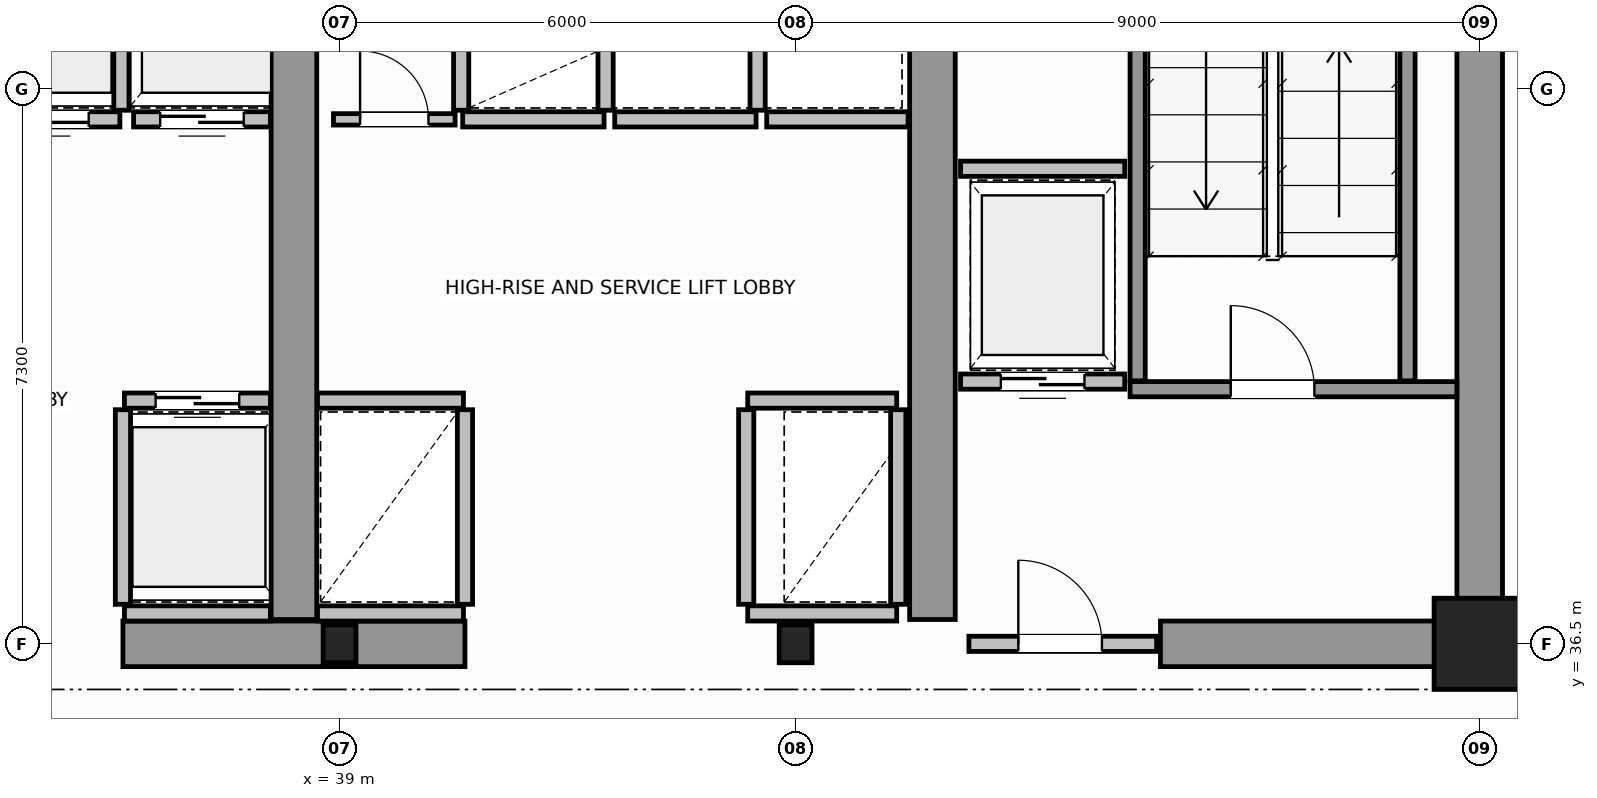
"""IFC4 building model, lengths in metres.
Left out: names, types, materials, properties, quantities, classifications, styles, units other than length and angle.
Written with IfcOpenShell. Run it as: python <this file> out.ifc"""

import sys

from ifc_helpers import new_model, si_unit, direction, frame, frame_2d, origin, origin_2d, place, context, subcontext, project, spatial, rectangle, i_section, extrude, source, transform, mapped, element, fill, save


model = new_model("IFC4")
c1 = context("Model", 3, precision=1e-05, world=origin(), true_north=direction((0.0, 1.0)))
c2 = subcontext(c1, "Body", "Model", "MODEL_VIEW")
j1 = project(units=[si_unit("LENGTHUNIT", "METRE"), si_unit("PLANEANGLEUNIT", "RADIAN")], contexts=[c1])
p1 = place(None, origin())
s1 = spatial("IfcSite", under=j1, at=p1, CompositionType="ELEMENT")
p2 = place(p1, origin())
s2 = spatial("IfcBuilding", under=s1, at=p2, CompositionType="ELEMENT")
p3 = place(p2, frame((0.0, 0.0, 184.2)))
s3 = spatial("IfcBuildingStorey", under=s2, at=p3, CompositionType="ELEMENT", Elevation=184.2)
m1 = source(origin(), c2, "Body", "SweptSolid", [
    extrude(i_section(OverallWidth=0.432, OverallDepth=0.498, WebThickness=0.055, FlangeThickness=0.068, FilletRadius=0.015, at=origin_2d()), origin(), (0.0, 0.0, 1.0), 3.8),
])
for number, where, z_axis, x_axis in (
    (1, (39.0, 36.5, 0.0), (0.0, 0.0, 1.0), (1.0, 0.0, 0.0)),
    (2, (45.0, 36.5, 0.0), (0.0, 0.0, 1.0), (1.0, 0.0, 0.0)),
):
    element("IfcColumn", number, at=place(p3, frame(where, z_axis=z_axis, x_axis=x_axis)), inside=s3, PredefinedType="COLUMN", context=c2, shape_type="MappedRepresentation", body=[
        mapped(m1, transform((0.0, 0.0, 0.0), scale=1.0)),
    ])
m2 = source(origin(), c2, "Body", "SweptSolid", [
    extrude(rectangle(XDim=1.2, YDim=1.2, at=origin_2d()), origin(), (0.0, 0.0, 1.0), 3.8),
])
p4 = place(p3, frame((54.0, 36.5, 0.0), z_axis=(0.0, 0.0, 1.0), x_axis=(1.0, 0.0, 0.0)))
e3 = element("IfcColumn", 3, at=p4, inside=s3, PredefinedType="COLUMN", context=c2, shape_type="MappedRepresentation", body=[
    mapped(m2, transform((0.0, 0.0, 0.0), scale=1.0)),
])
p5 = place(p3, frame((54.0, 36.5, 0.0), z_axis=(0.0, 0.0, 1.0), x_axis=(0.0, 1.0, 0.0)))
e4 = element("IfcWall", 4, at=p5, inside=s3, PredefinedType="SHEAR", context=c2, shape_type="SweptSolid", body=[
    extrude(rectangle(XDim=14.5, YDim=0.6, at=frame_2d((7.25, 0.0))), origin(), (0.0, 0.0, 1.0), 3.8),
])
p6 = place(p3, frame((36.15, 36.5, 0.0), z_axis=(0.0, 0.0, 1.0), x_axis=(1.0, 0.0, 0.0)))
e5 = element("IfcWall", 5, at=p6, inside=s3, PredefinedType="SHEAR", context=c2, shape_type="SweptSolid", body=[
    extrude(rectangle(XDim=4.5, YDim=0.6, at=frame_2d((2.25, 0.0))), origin(), (0.0, 0.0, 1.0), 3.8),
])
p7 = place(p3, frame((49.8, 36.5, 0.0), z_axis=(0.0, 0.0, 1.0), x_axis=(1.0, 0.0, 0.0)))
e6 = element("IfcWall", 6, at=p7, inside=s3, PredefinedType="SHEAR", context=c2, shape_type="SweptSolid", body=[
    extrude(rectangle(XDim=3.88, YDim=0.6, at=frame_2d((1.94, 0.0))), origin(), (0.0, 0.0, 1.0), 2.58),
])
for number, where, z_axis, x_axis in (
    (7, (38.4, 36.82, 0.0), (0.0, 0.0, 1.0), (0.0, 1.0, 0.0)),
    (8, (46.8, 36.82, 0.0), (0.0, 0.0, 1.0), (0.0, 1.0, 0.0)),
):
    element("IfcWall", number, at=place(p3, frame(where, z_axis=z_axis, x_axis=x_axis)), inside=s3, PredefinedType="SHEAR", context=c2, shape_type="SweptSolid", body=[
        extrude(rectangle(XDim=9.38, YDim=0.6, at=frame_2d((4.69, 0.0))), origin(), (0.0, 0.0, 1.0), 3.8),
    ])
p8 = place(p3, frame((49.4, 39.85, 0.0), z_axis=(0.0, 0.0, 1.0), x_axis=(1.0, 0.0, 0.0)))
e9 = element("IfcWall", 9, at=p8, inside=s3, PredefinedType="SOLIDWALL", context=c2, shape_type="SweptSolid", body=[
    extrude(rectangle(XDim=4.3, YDim=0.2, at=frame_2d((2.15, 0.0))), origin(), (0.0, 0.0, 1.0), 3.8),
])
p9 = place(p8, frame((1.325, 0.0, 0.0)))
e10 = element("IfcOpeningElement", 10, at=p9, cuts=e9, PredefinedType="OPENING", context=c2, shape_type="SweptSolid", body=[
    extrude(rectangle(XDim=1.1, YDim=2.15, at=frame_2d((0.55, 1.075))), frame((0.0, 0.11, 0.0), z_axis=(0.0, -1.0, 0.0), x_axis=(1.0, 0.0, 0.0)), (0.0, 0.0, 1.0), 0.22),
])
for number, where, z_axis, x_axis in (
    (11, (49.5, 39.96, 0.0), (0.0, 0.0, 1.0), (0.0, 1.0, 0.0)),
    (12, (53.05, 39.96, 0.0), (0.0, 0.0, 1.0), (0.0, 1.0, 0.0)),
):
    element("IfcWall", number, at=place(p3, frame(where, z_axis=z_axis, x_axis=x_axis)), inside=s3, PredefinedType="SOLIDWALL", context=c2, shape_type="SweptSolid", body=[
        extrude(rectangle(XDim=9.93, YDim=0.2, at=frame_2d((4.965, 0.0))), origin(), (0.0, 0.0, 1.0), 3.8),
    ])
p10 = place(p3, frame((47.28, 36.5, 0.0), z_axis=(0.0, 0.0, 1.0), x_axis=(1.0, 0.0, 0.0)))
e13 = element("IfcWall", 13, at=p10, inside=s3, PredefinedType="SOLIDWALL", context=c2, shape_type="SweptSolid", body=[
    extrude(rectangle(XDim=2.47, YDim=0.2, at=frame_2d((1.235, 0.0))), origin(), (0.0, 0.0, 1.0), 2.57),
])
p11 = place(p10, frame((0.65, 0.0, 0.0)))
e14 = element("IfcOpeningElement", 14, at=p11, cuts=e13, PredefinedType="OPENING", context=c2, shape_type="SweptSolid", body=[
    extrude(rectangle(XDim=1.1, YDim=2.15, at=frame_2d((0.55, 1.075))), frame((0.0, 0.11, 0.0), z_axis=(0.0, -1.0, 0.0), x_axis=(1.0, 0.0, 0.0)), (0.0, 0.0, 1.0), 0.22),
])
p12 = place(p3, frame((36.17, 39.7, 0.0), z_axis=(0.0, 0.0, 1.0), x_axis=(1.0, 0.0, 0.0)))
e15 = element("IfcWall", 15, at=p12, inside=s3, PredefinedType="SOLIDWALL", context=c2, shape_type="SweptSolid", body=[
    extrude(rectangle(XDim=1.92, YDim=0.2, at=frame_2d((0.96, 0.0))), origin(), (0.0, 0.0, 1.0), 3.58),
])
p13 = place(p12, frame((0.41, 0.0, 0.0)))
e16 = element("IfcOpeningElement", 16, at=p13, cuts=e15, PredefinedType="OPENING", context=c2, shape_type="SweptSolid", body=[
    extrude(rectangle(XDim=1.1, YDim=2.15, at=frame_2d((0.55, 1.075))), frame((0.0, 0.11, 0.0), z_axis=(0.0, -1.0, 0.0), x_axis=(1.0, 0.0, 0.0)), (0.0, 0.0, 1.0), 0.22),
])
p14 = place(p3, frame((36.17, 36.9, 0.0), z_axis=(0.0, 0.0, 1.0), x_axis=(1.0, 0.0, 0.0)))
e17 = element("IfcWall", 17, at=p14, inside=s3, PredefinedType="SOLIDWALL", context=c2, shape_type="SweptSolid", body=[
    extrude(rectangle(XDim=1.92, YDim=0.2, at=frame_2d((0.96, 0.0))), origin(), (0.0, 0.0, 1.0), 3.58),
])
p15 = place(p3, frame((36.15, 37.02, 0.0), z_axis=(0.0, 0.0, 1.0), x_axis=(0.0, 1.0, 0.0)))
e18 = element("IfcWall", 18, at=p15, inside=s3, PredefinedType="SOLIDWALL", context=c2, shape_type="SweptSolid", body=[
    extrude(rectangle(XDim=2.56, YDim=0.2, at=frame_2d((1.28, 0.0))), origin(), (0.0, 0.0, 1.0), 3.58),
])
p16 = place(p3, frame((34.19, 43.4, 0.0), z_axis=(0.0, 0.0, 1.0), x_axis=(1.0, 0.0, 0.0)))
e19 = element("IfcWall", 19, at=p16, inside=s3, PredefinedType="SOLIDWALL", context=c2, shape_type="SweptSolid", body=[
    extrude(rectangle(XDim=1.92, YDim=0.2, at=frame_2d((0.96, 0.0))), origin(), (0.0, 0.0, 1.0), 3.58),
])
p17 = place(p16, frame((0.41, 0.0, 0.0)))
e20 = element("IfcOpeningElement", 20, at=p17, cuts=e19, PredefinedType="OPENING", context=c2, shape_type="SweptSolid", body=[
    extrude(rectangle(XDim=1.1, YDim=2.15, at=frame_2d((0.55, 1.075))), frame((0.0, 0.11, 0.0), z_axis=(0.0, -1.0, 0.0), x_axis=(1.0, 0.0, 0.0)), (0.0, 0.0, 1.0), 0.22),
])
p18 = place(p3, frame((36.13, 43.52, 0.0), z_axis=(0.0, 0.0, 1.0), x_axis=(0.0, 1.0, 0.0)))
e21 = element("IfcWall", 21, at=p18, inside=s3, PredefinedType="SOLIDWALL", context=c2, shape_type="SweptSolid", body=[
    extrude(rectangle(XDim=2.56, YDim=0.2, at=frame_2d((1.28, 0.0))), origin(), (0.0, 0.0, 1.0), 3.58),
])
p19 = place(p3, frame((36.29, 43.4, 0.0), z_axis=(0.0, 0.0, 1.0), x_axis=(1.0, 0.0, 0.0)))
e22 = element("IfcWall", 22, at=p19, inside=s3, PredefinedType="SOLIDWALL", context=c2, shape_type="SweptSolid", body=[
    extrude(rectangle(XDim=1.8, YDim=0.2, at=frame_2d((0.9, 0.0))), origin(), (0.0, 0.0, 1.0), 3.58),
])
p20 = place(p19, frame((0.35, 0.0, 0.0)))
e23 = element("IfcOpeningElement", 23, at=p20, cuts=e22, PredefinedType="OPENING", context=c2, shape_type="SweptSolid", body=[
    extrude(rectangle(XDim=1.1, YDim=2.15, at=frame_2d((0.55, 1.075))), frame((0.0, 0.11, 0.0), z_axis=(0.0, -1.0, 0.0), x_axis=(1.0, 0.0, 0.0)), (0.0, 0.0, 1.0), 0.22),
])
for number, where, z_axis, x_axis in (
    (24, (38.71, 39.7, 0.0), (0.0, 0.0, 1.0), (1.0, 0.0, 0.0)),
    (25, (38.71, 36.9, 0.0), (0.0, 0.0, 1.0), (1.0, 0.0, 0.0)),
):
    element("IfcWall", number, at=place(p3, frame(where, z_axis=z_axis, x_axis=x_axis)), inside=s3, PredefinedType="SOLIDWALL", context=c2, shape_type="SweptSolid", body=[
        extrude(rectangle(XDim=1.92, YDim=0.2, at=frame_2d((0.96, 0.0))), origin(), (0.0, 0.0, 1.0), 3.58),
    ])
p21 = place(p3, frame((40.65, 37.02, 0.0), z_axis=(0.0, 0.0, 1.0), x_axis=(0.0, 1.0, 0.0)))
e26 = element("IfcWall", 26, at=p21, inside=s3, PredefinedType="SOLIDWALL", context=c2, shape_type="SweptSolid", body=[
    extrude(rectangle(XDim=2.56, YDim=0.2, at=frame_2d((1.28, 0.0))), origin(), (0.0, 0.0, 1.0), 3.58),
])
p22 = place(p3, frame((44.37, 39.7, 0.0), z_axis=(0.0, 0.0, 1.0), x_axis=(1.0, 0.0, 0.0)))
e27 = element("IfcWall", 27, at=p22, inside=s3, PredefinedType="SOLIDWALL", context=c2, shape_type="SweptSolid", body=[
    extrude(rectangle(XDim=1.96, YDim=0.2, at=frame_2d((0.98, 0.0))), origin(), (0.0, 0.0, 1.0), 3.58),
])
p23 = place(p3, frame((44.37, 36.9, 0.0), z_axis=(0.0, 0.0, 1.0), x_axis=(1.0, 0.0, 0.0)))
e28 = element("IfcWall", 28, at=p23, inside=s3, PredefinedType="SOLIDWALL", context=c2, shape_type="SweptSolid", body=[
    extrude(rectangle(XDim=1.96, YDim=0.2, at=frame_2d((0.98, 0.0))), origin(), (0.0, 0.0, 1.0), 2.57),
])
for number, where, z_axis, x_axis in (
    (29, (44.35, 37.02, 0.0), (0.0, 0.0, 1.0), (0.0, 1.0, 0.0)),
    (30, (46.35, 37.02, 0.0), (0.0, 0.0, 1.0), (0.0, 1.0, 0.0)),
):
    element("IfcWall", number, at=place(p3, frame(where, z_axis=z_axis, x_axis=x_axis)), inside=s3, PredefinedType="SOLIDWALL", context=c2, shape_type="SweptSolid", body=[
        extrude(rectangle(XDim=2.56, YDim=0.2, at=frame_2d((1.28, 0.0))), origin(), (0.0, 0.0, 1.0), 3.58),
    ])
p24 = place(p3, frame((40.62, 43.4, 0.0), z_axis=(0.0, 0.0, 1.0), x_axis=(1.0, 0.0, 0.0)))
e31 = element("IfcWall", 31, at=p24, inside=s3, PredefinedType="SOLIDWALL", context=c2, shape_type="SweptSolid", body=[
    extrude(rectangle(XDim=1.86, YDim=0.2, at=frame_2d((0.93, 0.0))), origin(), (0.0, 0.0, 1.0), 3.58),
])
for number, where, z_axis, x_axis in (
    (32, (40.6, 43.52, 0.0), (0.0, 0.0, 1.0), (0.0, 1.0, 0.0)),
    (33, (42.5, 43.52, 0.0), (0.0, 0.0, 1.0), (0.0, 1.0, 0.0)),
):
    element("IfcWall", number, at=place(p3, frame(where, z_axis=z_axis, x_axis=x_axis)), inside=s3, PredefinedType="SOLIDWALL", context=c2, shape_type="SweptSolid", body=[
        extrude(rectangle(XDim=2.56, YDim=0.2, at=frame_2d((1.28, 0.0))), origin(), (0.0, 0.0, 1.0), 3.58),
    ])
p25 = place(p3, frame((42.62, 43.4, 0.0), z_axis=(0.0, 0.0, 1.0), x_axis=(1.0, 0.0, 0.0)))
e34 = element("IfcWall", 34, at=p25, inside=s3, PredefinedType="SOLIDWALL", context=c2, shape_type="SweptSolid", body=[
    extrude(rectangle(XDim=1.86, YDim=0.2, at=frame_2d((0.93, 0.0))), origin(), (0.0, 0.0, 1.0), 3.58),
])
p26 = place(p3, frame((44.5, 43.52, 0.0), z_axis=(0.0, 0.0, 1.0), x_axis=(0.0, 1.0, 0.0)))
e35 = element("IfcWall", 35, at=p26, inside=s3, PredefinedType="SOLIDWALL", context=c2, shape_type="SweptSolid", body=[
    extrude(rectangle(XDim=2.56, YDim=0.2, at=frame_2d((1.28, 0.0))), origin(), (0.0, 0.0, 1.0), 3.58),
])
p27 = place(p3, frame((44.62, 43.4, 0.0), z_axis=(0.0, 0.0, 1.0), x_axis=(1.0, 0.0, 0.0)))
e36 = element("IfcWall", 36, at=p27, inside=s3, PredefinedType="SOLIDWALL", context=c2, shape_type="SweptSolid", body=[
    extrude(rectangle(XDim=1.86, YDim=0.2, at=frame_2d((0.93, 0.0))), origin(), (0.0, 0.0, 1.0), 3.58),
])
p28 = place(p3, frame((47.17, 39.95, 0.0), z_axis=(0.0, 0.0, 1.0), x_axis=(1.0, 0.0, 0.0)))
e37 = element("IfcWall", 37, at=p28, inside=s3, PredefinedType="SOLIDWALL", context=c2, shape_type="SweptSolid", body=[
    extrude(rectangle(XDim=2.16, YDim=0.2, at=frame_2d((1.08, 0.0))), origin(), (0.0, 0.0, 1.0), 3.58),
])
p29 = place(p28, frame((0.53, 0.0, 0.0)))
e38 = element("IfcOpeningElement", 38, at=p29, cuts=e37, PredefinedType="OPENING", context=c2, shape_type="SweptSolid", body=[
    extrude(rectangle(XDim=1.1, YDim=2.15, at=frame_2d((0.55, 1.075))), frame((0.0, 0.11, 0.0), z_axis=(0.0, -1.0, 0.0), x_axis=(1.0, 0.0, 0.0)), (0.0, 0.0, 1.0), 0.22),
])
p30 = place(p3, frame((47.17, 42.75, 0.0), z_axis=(0.0, 0.0, 1.0), x_axis=(1.0, 0.0, 0.0)))
e39 = element("IfcWall", 39, at=p30, inside=s3, PredefinedType="SOLIDWALL", context=c2, shape_type="SweptSolid", body=[
    extrude(rectangle(XDim=2.16, YDim=0.2, at=frame_2d((1.08, 0.0))), origin(), (0.0, 0.0, 1.0), 3.58),
])
p31 = place(p3, frame((38.92, 43.4, 0.0), z_axis=(0.0, 0.0, 1.0), x_axis=(1.0, 0.0, 0.0)))
e40 = element("IfcWall", 40, at=p31, inside=s3, PredefinedType="PARTITIONING", context=c2, shape_type="SweptSolid", body=[
    extrude(rectangle(XDim=1.6, YDim=0.15, at=frame_2d((0.8, 0.0))), origin(), (0.0, 0.0, 1.0), 3.58),
])
p32 = place(p31, frame((0.35, 0.0, 0.0)))
e41 = element("IfcOpeningElement", 41, at=p32, cuts=e40, PredefinedType="OPENING", context=c2, shape_type="SweptSolid", body=[
    extrude(rectangle(XDim=0.9, YDim=2.1, at=frame_2d((0.45, 1.05))), frame((0.0, 0.085, 0.0), z_axis=(0.0, -1.0, 0.0), x_axis=(1.0, 0.0, 0.0)), (0.0, 0.0, 1.0), 0.17),
])
p33 = place(p3, frame((54.06, 36.48, 0.0), z_axis=(0.0, 0.0, 1.0), x_axis=(1.0, 0.0, 0.0)))
e42 = element("IfcWall", 42, at=p33, inside=s3, PredefinedType="PARTITIONING", context=c2, shape_type="SweptSolid", body=[
    extrude(rectangle(XDim=6.651, YDim=0.12, at=frame_2d((3.325, 0.0))), origin(), (0.0, 0.0, 1.0), 2.97),
])
p34 = place(p33, frame((2.875, 0.0, 0.0)))
e43 = element("IfcOpeningElement", 43, at=p34, cuts=e42, PredefinedType="OPENING", context=c2, shape_type="SweptSolid", body=[
    extrude(rectangle(XDim=0.9, YDim=2.15, at=frame_2d((0.45, 1.075))), frame((0.0, 0.07, 0.0), z_axis=(0.0, -1.0, 0.0), x_axis=(1.0, 0.0, 0.0)), (0.0, 0.0, 1.0), 0.14),
])
m3 = source(origin(), c2, "Body", "SweptSolid", [
    extrude(rectangle(XDim=1.1, YDim=2.15, at=frame_2d((0.55, 1.075))), frame((0.0, 0.025, 0.0), z_axis=(0.0, -1.0, 0.0), x_axis=(1.0, 0.0, 0.0)), (0.0, 0.0, 1.0), 0.05),
])
p35 = place(p9, origin())
e44 = element("IfcDoor", 44, at=p35, inside=s3, OperationType="SINGLE_SWING_RIGHT", PredefinedType="DOOR", context=c2, shape_type="MappedRepresentation", body=[
    mapped(m3, transform((0.0, 0.0, 0.0), scale=1.0)),
])
fill(e10, e44)
p36 = place(p11, origin())
e45 = element("IfcDoor", 45, at=p36, inside=s3, OperationType="SINGLE_SWING_LEFT", PredefinedType="DOOR", context=c2, shape_type="MappedRepresentation", body=[
    mapped(m3, transform((0.0, 0.0, 0.0), scale=1.0)),
])
fill(e14, e45)
p37 = place(p13, origin())
e46 = element("IfcDoor", 46, at=p37, inside=s3, OperationType="DOUBLE_DOOR_SLIDING", PredefinedType="DOOR", context=c2, shape_type="MappedRepresentation", body=[
    mapped(m3, transform((0.0, 0.0, 0.0), scale=1.0)),
])
fill(e16, e46)
p38 = place(p17, origin())
e47 = element("IfcDoor", 47, at=p38, inside=s3, OperationType="DOUBLE_DOOR_SLIDING", PredefinedType="DOOR", context=c2, shape_type="MappedRepresentation", body=[
    mapped(m3, transform((0.0, 0.0, 0.0), scale=1.0)),
])
fill(e20, e47)
p39 = place(p20, origin())
e48 = element("IfcDoor", 48, at=p39, inside=s3, OperationType="DOUBLE_DOOR_SLIDING", PredefinedType="DOOR", context=c2, shape_type="MappedRepresentation", body=[
    mapped(m3, transform((0.0, 0.0, 0.0), scale=1.0)),
])
fill(e23, e48)
p40 = place(p29, origin())
e49 = element("IfcDoor", 49, at=p40, inside=s3, OperationType="DOUBLE_DOOR_SLIDING", PredefinedType="DOOR", context=c2, shape_type="MappedRepresentation", body=[
    mapped(m3, transform((0.0, 0.0, 0.0), scale=1.0)),
])
fill(e38, e49)
m4 = source(origin(), c2, "Body", "SweptSolid", [
    extrude(rectangle(XDim=0.9, YDim=2.1, at=frame_2d((0.45, 1.05))), frame((0.0, 0.025, 0.0), z_axis=(0.0, -1.0, 0.0), x_axis=(1.0, 0.0, 0.0)), (0.0, 0.0, 1.0), 0.05),
])
p41 = place(p32, origin())
e50 = element("IfcDoor", 50, at=p41, inside=s3, OperationType="SINGLE_SWING_LEFT", PredefinedType="DOOR", context=c2, shape_type="MappedRepresentation", body=[
    mapped(m4, transform((0.0, 0.0, 0.0), scale=1.0)),
])
fill(e41, e50)
save(model, sys.argv[1])
